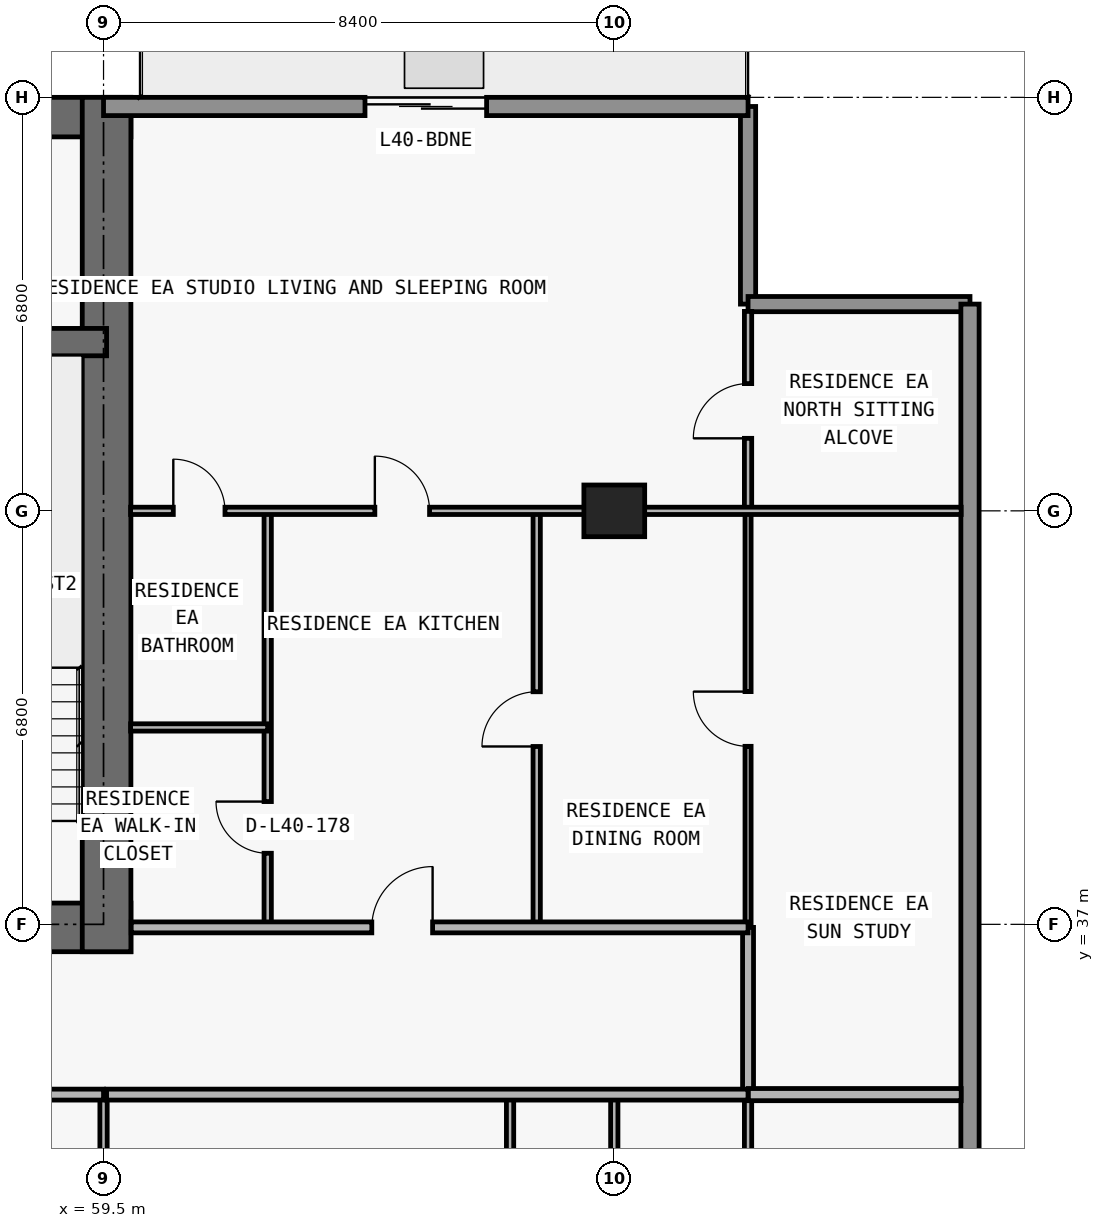
"""IFC4 building model, lengths in metres.
Left out: names, types, materials, properties, quantities, classifications, styles, units other than length and angle.
Written with IfcOpenShell. Run it as: python <this file> out.ifc"""

import sys

from ifc_helpers import new_model, si_unit, direction, frame, frame_2d, origin, origin_2d, place, context, subcontext, project, spatial, rectangle, extrude, element, fill, save


model = new_model("IFC4")
c1 = context("Model", 3, precision=1e-05, world=origin(), true_north=direction((0.0, 1.0)))
c2 = subcontext(c1, "Body", "Model", "MODEL_VIEW")
j1 = project(units=[si_unit("LENGTHUNIT", "METRE"), si_unit("PLANEANGLEUNIT", "RADIAN")], contexts=[c1])
p1 = place(None, origin())
s1 = spatial("IfcSite", under=j1, at=p1, CompositionType="ELEMENT")
p2 = place(p1, origin())
s2 = spatial("IfcBuilding", under=s1, at=p2, CompositionType="ELEMENT")
p3 = place(p2, frame((0.0, 0.0, 145.5)))
s3 = spatial("IfcBuildingStorey", under=s2, at=p3, CompositionType="ELEMENT", Elevation=145.5)
p4 = place(p3, frame((67.9, 43.8, 0.0), z_axis=(0.0, 0.0, 1.0), x_axis=(1.0, 0.0, 0.0)))
e1 = element("IfcColumn", 1, at=p4, inside=s3, PredefinedType="COLUMN", context=c2, shape_type="SweptSolid", body=[
    extrude(rectangle(XDim=1.0, YDim=0.85, at=origin_2d()), origin(), (0.0, 0.0, 1.0), 3.05),
])
p5 = place(p3, frame((17.85, 36.95, 0.0), z_axis=(0.0, 0.0, 1.0), x_axis=(1.0, 0.0, 0.0)))
e2 = element("IfcWall", 2, at=p5, inside=s3, PredefinedType="SHEAR", context=c2, shape_type="SweptSolid", body=[
    extrude(rectangle(XDim=42.1, YDim=0.8, at=frame_2d((21.05, 0.0))), origin(), (0.0, 0.0, 1.0), 3.05),
])
p6 = place(p5, frame((14.45, 0.0, 0.0)))
e3 = element("IfcOpeningElement", 3, at=p6, cuts=e2, PredefinedType="OPENING", context=c2, shape_type="SweptSolid", body=[
    extrude(rectangle(XDim=1.1, YDim=2.15, at=frame_2d((0.55, 1.075))), frame((0.0, 0.41, 0.0), z_axis=(0.0, -1.0, 0.0), x_axis=(1.0, 0.0, 0.0)), (0.0, 0.0, 1.0), 0.82),
])
p7 = place(p5, frame((6.3, 0.0, 0.0)))
e4 = element("IfcOpeningElement", 4, at=p7, cuts=e2, PredefinedType="OPENING", context=c2, shape_type="SweptSolid", body=[
    extrude(rectangle(XDim=1.05, YDim=2.15, at=frame_2d((0.525, 1.075))), frame((0.0, 0.41, 0.0), z_axis=(0.0, -1.0, 0.0), x_axis=(1.0, 0.0, 0.0)), (0.0, 0.0, 1.0), 0.82),
])
p8 = place(p5, frame((34.8, 0.0, 0.0)))
e5 = element("IfcOpeningElement", 5, at=p8, cuts=e2, PredefinedType="OPENING", context=c2, shape_type="SweptSolid", body=[
    extrude(rectangle(XDim=1.05, YDim=2.15, at=frame_2d((0.525, 1.075))), frame((0.0, 0.41, 0.0), z_axis=(0.0, -1.0, 0.0), x_axis=(1.0, 0.0, 0.0)), (0.0, 0.0, 1.0), 0.82),
])
p9 = place(p5, frame((10.913, 0.0, 0.0)))
e6 = element("IfcOpeningElement", 6, at=p9, cuts=e2, PredefinedType="OPENING", context=c2, shape_type="SweptSolid", body=[
    extrude(rectangle(XDim=1.05, YDim=2.15, at=frame_2d((0.525, 1.075))), frame((0.0, 0.41, 0.0), z_axis=(0.0, -1.0, 0.0), x_axis=(1.0, 0.0, 0.0)), (0.0, 0.0, 1.0), 0.82),
])
p10 = place(p5, frame((24.15, 0.0, 0.0)))
e7 = element("IfcOpeningElement", 7, at=p10, cuts=e2, PredefinedType="OPENING", context=c2, shape_type="SweptSolid", body=[
    extrude(rectangle(XDim=1.05, YDim=2.15, at=frame_2d((0.525, 1.075))), frame((0.0, 0.41, 0.0), z_axis=(0.0, -1.0, 0.0), x_axis=(1.0, 0.0, 0.0)), (0.0, 0.0, 1.0), 0.82),
])
p11 = place(p3, frame((17.85, 50.275, 0.0), z_axis=(0.0, 0.0, 1.0), x_axis=(1.0, 0.0, 0.0)))
e8 = element("IfcWall", 8, at=p11, inside=s3, PredefinedType="SHEAR", context=c2, shape_type="SweptSolid", body=[
    extrude(rectangle(XDim=42.1, YDim=0.65, at=frame_2d((21.05, 0.0))), origin(), (0.0, 0.0, 1.0), 3.05),
])
p12 = place(p3, frame((59.55, 36.55, 0.0), z_axis=(0.0, 0.0, 1.0), x_axis=(0.0, 1.0, 0.0)))
e9 = element("IfcWall", 9, at=p12, inside=s3, PredefinedType="SHEAR", context=c2, shape_type="SweptSolid", body=[
    extrude(rectangle(XDim=14.05, YDim=0.8, at=frame_2d((7.025, 0.0))), origin(), (0.0, 0.0, 1.0), 3.05),
])
p13 = place(p3, frame((18.25, 46.575, 0.0), z_axis=(0.0, 0.0, 1.0), x_axis=(1.0, 0.0, 0.0)))
e10 = element("IfcWall", 10, at=p13, inside=s3, PredefinedType="SHEAR", context=c2, shape_type="SweptSolid", body=[
    extrude(rectangle(XDim=41.3, YDim=0.45, at=frame_2d((20.65, 0.0))), origin(), (0.0, 0.0, 1.0), 3.05),
])
p14 = place(p13, frame((7.625, 0.0, 0.0)))
e11 = element("IfcOpeningElement", 11, at=p14, cuts=e10, PredefinedType="OPENING", context=c2, shape_type="SweptSolid", body=[
    extrude(rectangle(XDim=1.05, YDim=2.15, at=frame_2d((0.525, 1.075))), frame((0.0, 0.235, 0.0), z_axis=(0.0, -1.0, 0.0), x_axis=(1.0, 0.0, 0.0)), (0.0, 0.0, 1.0), 0.47),
])
p15 = place(p13, frame((32.675, 0.0, 0.0)))
e12 = element("IfcOpeningElement", 12, at=p15, cuts=e10, PredefinedType="OPENING", context=c2, shape_type="SweptSolid", body=[
    extrude(rectangle(XDim=1.05, YDim=2.15, at=frame_2d((0.525, 1.075))), frame((0.0, 0.235, 0.0), z_axis=(0.0, -1.0, 0.0), x_axis=(1.0, 0.0, 0.0)), (0.0, 0.0, 1.0), 0.47),
])
p16 = place(p3, frame((70.1, 50.45, 0.0), z_axis=(0.0, 0.0, 1.0), x_axis=(0.0, -1.0, 0.0)))
e13 = element("IfcWall", 13, at=p16, inside=s3, PredefinedType="ELEMENTEDWALL", context=c2, shape_type="SweptSolid", body=[
    extrude(rectangle(XDim=3.25, YDim=0.25, at=frame_2d((1.625, 0.0))), origin(), (0.0, 0.0, 1.0), 3.05),
])
p17 = place(p3, frame((70.1, 47.2, 0.0), z_axis=(0.0, 0.0, 1.0), x_axis=(1.0, 0.0, 0.0)))
e14 = element("IfcWall", 14, at=p17, inside=s3, PredefinedType="ELEMENTEDWALL", context=c2, shape_type="SweptSolid", body=[
    extrude(rectangle(XDim=3.65, YDim=0.25, at=frame_2d((1.825, 0.0))), origin(), (0.0, 0.0, 1.0), 3.05),
])
p18 = place(p3, frame((73.75, 47.2, 0.0), z_axis=(0.0, 0.0, 1.0), x_axis=(0.0, -1.0, 0.0)))
e15 = element("IfcWall", 15, at=p18, inside=s3, PredefinedType="STANDARD", context=c2, shape_type="SweptSolid", body=[
    extrude(rectangle(XDim=19.2, YDim=0.3, at=frame_2d((9.6, 0.0))), origin(), (0.0, 0.0, 1.0), 3.05),
])
p19 = place(p3, frame((59.5, 50.45, 0.0), z_axis=(0.0, 0.0, 1.0), x_axis=(1.0, 0.0, 0.0)))
e16 = element("IfcWall", 16, at=p19, inside=s3, PredefinedType="STANDARD", context=c2, shape_type="SweptSolid", body=[
    extrude(rectangle(XDim=10.6, YDim=0.3, at=frame_2d((5.3, 0.0))), origin(), (0.0, 0.0, 1.0), 3.05),
])
p20 = place(p19, frame((4.3, 0.0, 0.0)))
e17 = element("IfcOpeningElement", 17, at=p20, cuts=e16, PredefinedType="OPENING", context=c2, shape_type="SweptSolid", body=[
    extrude(rectangle(XDim=2.0, YDim=2.3, at=frame_2d((1.0, 1.15))), frame((0.0, 0.16, 0.0), z_axis=(0.0, -1.0, 0.0), x_axis=(1.0, 0.0, 0.0)), (0.0, 0.0, 1.0), 0.32),
])
p21 = place(p3, frame((59.5, 29.84, 0.0), z_axis=(0.0, 0.0, 1.0), x_axis=(0.0, 1.0, 0.0)))
e18 = element("IfcWall", 18, at=p21, inside=s3, PredefinedType="PARTITIONING", context=c2, shape_type="SweptSolid", body=[
    extrude(rectangle(XDim=4.36, YDim=0.12, at=frame_2d((2.18, 0.0))), origin(), (0.0, 0.0, 1.0), 2.174),
])
p22 = place(p3, frame((62.2, 36.95, 0.0), z_axis=(0.0, 0.0, 1.0), x_axis=(0.0, 1.0, 0.0)))
e19 = element("IfcWall", 19, at=p22, inside=s3, PredefinedType="PARTITIONING", context=c2, shape_type="SweptSolid", body=[
    extrude(rectangle(XDim=6.85, YDim=0.12, at=frame_2d((3.425, 0.0))), origin(), (0.0, 0.0, 1.0), 2.499),
])
p23 = place(p22, frame((1.219, 0.0, 0.0)))
e20 = element("IfcOpeningElement", 20, at=p23, cuts=e19, PredefinedType="OPENING", context=c2, shape_type="SweptSolid", body=[
    extrude(rectangle(XDim=0.85, YDim=2.1, at=frame_2d((0.425, 1.05))), frame((0.0, 0.07, 0.0), z_axis=(0.0, -1.0, 0.0), x_axis=(1.0, 0.0, 0.0)), (0.0, 0.0, 1.0), 0.14),
])
p24 = place(p3, frame((66.186, 29.84, 0.0), z_axis=(0.0, 0.0, 1.0), x_axis=(0.0, 1.0, 0.0)))
e21 = element("IfcWall", 21, at=p24, inside=s3, PredefinedType="PARTITIONING", context=c2, shape_type="SweptSolid", body=[
    extrude(rectangle(XDim=4.36, YDim=0.12, at=frame_2d((2.18, 0.0))), origin(), (0.0, 0.0, 1.0), 3.05),
])
p25 = place(p24, frame((1.755, 0.0, 0.0)))
e22 = element("IfcOpeningElement", 22, at=p25, cuts=e21, PredefinedType="OPENING", context=c2, shape_type="SweptSolid", body=[
    extrude(rectangle(XDim=0.85, YDim=2.1, at=frame_2d((0.425, 1.05))), frame((0.0, 0.07, 0.0), z_axis=(0.0, -1.0, 0.0), x_axis=(1.0, 0.0, 0.0)), (0.0, 0.0, 1.0), 0.14),
])
p26 = place(p3, frame((66.624, 36.95, 0.0), z_axis=(0.0, 0.0, 1.0), x_axis=(0.0, 1.0, 0.0)))
e23 = element("IfcWall", 23, at=p26, inside=s3, PredefinedType="PARTITIONING", context=c2, shape_type="SweptSolid", body=[
    extrude(rectangle(XDim=6.85, YDim=0.12, at=frame_2d((3.425, 0.0))), origin(), (0.0, 0.0, 1.0), 3.05),
])
p27 = place(p26, frame((2.975, 0.0, 0.0)))
e24 = element("IfcOpeningElement", 24, at=p27, cuts=e23, PredefinedType="OPENING", context=c2, shape_type="SweptSolid", body=[
    extrude(rectangle(XDim=0.9, YDim=2.15, at=frame_2d((0.45, 1.075))), frame((0.0, 0.07, 0.0), z_axis=(0.0, -1.0, 0.0), x_axis=(1.0, 0.0, 0.0)), (0.0, 0.0, 1.0), 0.14),
])
p28 = place(p3, frame((67.9, 29.84, 0.0), z_axis=(0.0, 0.0, 1.0), x_axis=(0.0, 1.0, 0.0)))
e25 = element("IfcWall", 25, at=p28, inside=s3, PredefinedType="PARTITIONING", context=c2, shape_type="SweptSolid", body=[
    extrude(rectangle(XDim=4.36, YDim=0.12, at=frame_2d((2.18, 0.0))), origin(), (0.0, 0.0, 1.0), 2.174),
])
p29 = place(p3, frame((70.1, 29.84, 0.0), z_axis=(0.0, 0.0, 1.0), x_axis=(0.0, 1.0, 0.0)))
e26 = element("IfcWall", 26, at=p29, inside=s3, PredefinedType="PARTITIONING", context=c2, shape_type="SweptSolid", body=[
    extrude(rectangle(XDim=4.36, YDim=0.12, at=frame_2d((2.18, 0.0))), origin(), (0.0, 0.0, 1.0), 3.05),
])
p30 = place(p3, frame((70.1, 34.205, 0.0), z_axis=(0.0, 0.0, 1.0), x_axis=(0.0, 1.0, 0.0)))
e27 = element("IfcWall", 27, at=p30, inside=s3, PredefinedType="PARTITIONING", context=c2, shape_type="SweptSolid", body=[
    extrude(rectangle(XDim=2.745, YDim=0.18, at=frame_2d((1.373, 0.0))), origin(), (0.0, 0.0, 1.0), 3.05),
])
p31 = place(p3, frame((70.1, 36.955, 0.0), z_axis=(0.0, 0.0, 1.0), x_axis=(0.0, 1.0, 0.0)))
e28 = element("IfcWall", 28, at=p31, inside=s3, PredefinedType="MOVABLE", context=c2, shape_type="SweptSolid", body=[
    extrude(rectangle(XDim=6.845, YDim=0.1, at=frame_2d((3.422, 0.0))), origin(), (0.0, 0.0, 1.0), 3.05),
])
p32 = place(p31, frame((2.972, 0.0, 0.0)))
e29 = element("IfcOpeningElement", 29, at=p32, cuts=e28, PredefinedType="OPENING", context=c2, shape_type="SweptSolid", body=[
    extrude(rectangle(XDim=0.9, YDim=2.15, at=frame_2d((0.45, 1.075))), frame((0.0, 0.06, 0.0), z_axis=(0.0, -1.0, 0.0), x_axis=(1.0, 0.0, 0.0)), (0.0, 0.0, 1.0), 0.12),
])
p33 = place(p3, frame((70.1, 43.805, 0.0), z_axis=(0.0, 0.0, 1.0), x_axis=(0.0, 1.0, 0.0)))
e30 = element("IfcWall", 30, at=p33, inside=s3, PredefinedType="PARTITIONING", context=c2, shape_type="SweptSolid", body=[
    extrude(rectangle(XDim=3.275, YDim=0.12, at=frame_2d((1.638, 0.0))), origin(), (0.0, 0.0, 1.0), 3.05),
])
p34 = place(p33, frame((1.188, 0.0, 0.0)))
e31 = element("IfcOpeningElement", 31, at=p34, cuts=e30, PredefinedType="OPENING", context=c2, shape_type="SweptSolid", body=[
    extrude(rectangle(XDim=0.9, YDim=2.15, at=frame_2d((0.45, 1.075))), frame((0.0, 0.07, 0.0), z_axis=(0.0, -1.0, 0.0), x_axis=(1.0, 0.0, 0.0)), (0.0, 0.0, 1.0), 0.14),
])
p35 = place(p3, frame((26.7, 34.2, 0.0), z_axis=(0.0, 0.0, 1.0), x_axis=(1.0, 0.0, 0.0)))
e32 = element("IfcWall", 32, at=p35, inside=s3, PredefinedType="PARTITIONING", context=c2, shape_type="SweptSolid", body=[
    extrude(rectangle(XDim=32.8, YDim=0.18, at=frame_2d((16.4, 0.0))), origin(), (0.0, 0.0, 1.0), 3.05),
])
p36 = place(p35, frame((2.519, 0.0, 0.0)))
e33 = element("IfcOpeningElement", 33, at=p36, cuts=e32, PredefinedType="OPENING", context=c2, shape_type="SweptSolid", body=[
    extrude(rectangle(XDim=1.0, YDim=2.2, at=frame_2d((0.5, 1.1))), frame((0.0, 0.1, 0.0), z_axis=(0.0, -1.0, 0.0), x_axis=(1.0, 0.0, 0.0)), (0.0, 0.0, 1.0), 0.2),
])
p37 = place(p35, frame((10.792, 0.0, 0.0)))
e34 = element("IfcOpeningElement", 34, at=p37, cuts=e32, PredefinedType="OPENING", context=c2, shape_type="SweptSolid", body=[
    extrude(rectangle(XDim=1.0, YDim=2.2, at=frame_2d((0.5, 1.1))), frame((0.0, 0.1, 0.0), z_axis=(0.0, -1.0, 0.0), x_axis=(1.0, 0.0, 0.0)), (0.0, 0.0, 1.0), 0.2),
])
p38 = place(p35, frame((27.146, 0.0, 0.0)))
e35 = element("IfcOpeningElement", 35, at=p38, cuts=e32, PredefinedType="OPENING", context=c2, shape_type="SweptSolid", body=[
    extrude(rectangle(XDim=1.0, YDim=2.2, at=frame_2d((0.5, 1.1))), frame((0.0, 0.1, 0.0), z_axis=(0.0, -1.0, 0.0), x_axis=(1.0, 0.0, 0.0)), (0.0, 0.0, 1.0), 0.2),
])
p39 = place(p3, frame((59.55, 34.2, 0.0), z_axis=(0.0, 0.0, 1.0), x_axis=(1.0, 0.0, 0.0)))
e36 = element("IfcWall", 36, at=p39, inside=s3, PredefinedType="PARTITIONING", context=c2, shape_type="SweptSolid", body=[
    extrude(rectangle(XDim=10.55, YDim=0.18, at=frame_2d((5.275, 0.0))), origin(), (0.0, 0.0, 1.0), 3.05),
])
p40 = place(p3, frame((70.105, 34.2, 0.0), z_axis=(0.0, 0.0, 1.0), x_axis=(1.0, 0.0, 0.0)))
e37 = element("IfcWall", 37, at=p40, inside=s3, PredefinedType="PARTITIONING", context=c2, shape_type="SweptSolid", body=[
    extrude(rectangle(XDim=3.5, YDim=0.2, at=frame_2d((1.75, 0.0))), origin(), (0.0, 0.0, 1.0), 3.05),
])
p41 = place(p3, frame((59.955, 36.95, 0.0), z_axis=(0.0, 0.0, 1.0), x_axis=(1.0, 0.0, 0.0)))
e38 = element("IfcWall", 38, at=p41, inside=s3, PredefinedType="PARTITIONING", context=c2, shape_type="SweptSolid", body=[
    extrude(rectangle(XDim=10.145, YDim=0.18, at=frame_2d((5.073, 0.0))), origin(), (0.0, 0.0, 1.0), 3.05),
])
p42 = place(p41, frame((3.957, 0.0, 0.0)))
e39 = element("IfcOpeningElement", 39, at=p42, cuts=e38, PredefinedType="OPENING", context=c2, shape_type="SweptSolid", body=[
    extrude(rectangle(XDim=1.0, YDim=2.2, at=frame_2d((0.5, 1.1))), frame((0.0, 0.1, 0.0), z_axis=(0.0, -1.0, 0.0), x_axis=(1.0, 0.0, 0.0)), (0.0, 0.0, 1.0), 0.2),
])
p43 = place(p3, frame((59.945, 40.238, 0.0), z_axis=(0.0, 0.0, 1.0), x_axis=(1.0, 0.0, 0.0)))
e40 = element("IfcWall", 40, at=p43, inside=s3, PredefinedType="PARTITIONING", context=c2, shape_type="SweptSolid", body=[
    extrude(rectangle(XDim=2.255, YDim=0.12, at=frame_2d((1.127, 0.0))), origin(), (0.0, 0.0, 1.0), 3.05),
])
p44 = place(p3, frame((59.945, 43.8, 0.0), z_axis=(0.0, 0.0, 1.0), x_axis=(1.0, 0.0, 0.0)))
e41 = element("IfcWall", 41, at=p44, inside=s3, PredefinedType="PARTITIONING", context=c2, shape_type="SweptSolid", body=[
    extrude(rectangle(XDim=13.66, YDim=0.12, at=frame_2d((6.83, 0.0))), origin(), (0.0, 0.0, 1.0), 2.339),
])
p45 = place(p44, frame((4.017, 0.0, 0.0)))
e42 = element("IfcOpeningElement", 42, at=p45, cuts=e41, PredefinedType="OPENING", context=c2, shape_type="SweptSolid", body=[
    extrude(rectangle(XDim=0.9, YDim=2.15, at=frame_2d((0.45, 1.075))), frame((0.0, 0.07, 0.0), z_axis=(0.0, -1.0, 0.0), x_axis=(1.0, 0.0, 0.0)), (0.0, 0.0, 1.0), 0.14),
])
p46 = place(p44, frame((0.702, 0.0, 0.0)))
e43 = element("IfcOpeningElement", 43, at=p46, cuts=e41, PredefinedType="OPENING", context=c2, shape_type="SweptSolid", body=[
    extrude(rectangle(XDim=0.85, YDim=2.1, at=frame_2d((0.425, 1.05))), frame((0.0, 0.07, 0.0), z_axis=(0.0, -1.0, 0.0), x_axis=(1.0, 0.0, 0.0)), (0.0, 0.0, 1.0), 0.14),
])
p47 = place(p20, origin())
e44 = element("IfcDoor", 44, at=p47, inside=s3, OperationType="DOUBLE_DOOR_SLIDING", PredefinedType="DOOR", context=c2, shape_type="SweptSolid", body=[
    extrude(rectangle(XDim=2.0, YDim=2.3, at=frame_2d((1.0, 1.15))), frame((0.0, 0.025, 0.0), z_axis=(0.0, -1.0, 0.0), x_axis=(1.0, 0.0, 0.0)), (0.0, 0.0, 1.0), 0.05),
])
fill(e17, e44)
p48 = place(p27, origin())
e45 = element("IfcDoor", 45, at=p48, inside=s3, OperationType="SINGLE_SWING_LEFT", PredefinedType="DOOR", context=c2, shape_type="SweptSolid", body=[
    extrude(rectangle(XDim=0.9, YDim=2.15, at=frame_2d((0.45, 1.075))), frame((0.0, 0.025, 0.0), z_axis=(0.0, -1.0, 0.0), x_axis=(1.0, 0.0, 0.0)), (0.0, 0.0, 1.0), 0.05),
])
fill(e24, e45)
p49 = place(p42, origin())
e46 = element("IfcDoor", 46, at=p49, inside=s3, OperationType="SINGLE_SWING_RIGHT", PredefinedType="DOOR", context=c2, shape_type="SweptSolid", body=[
    extrude(rectangle(XDim=1.0, YDim=2.2, at=frame_2d((0.5, 1.1))), frame((0.0, 0.025, 0.0), z_axis=(0.0, -1.0, 0.0), x_axis=(1.0, 0.0, 0.0)), (0.0, 0.0, 1.0), 0.05),
])
fill(e39, e46)
p50 = place(p45, origin())
e47 = element("IfcDoor", 47, at=p50, inside=s3, OperationType="SINGLE_SWING_LEFT", PredefinedType="DOOR", context=c2, shape_type="SweptSolid", body=[
    extrude(rectangle(XDim=0.9, YDim=2.15, at=frame_2d((0.45, 1.075))), frame((0.0, 0.025, 0.0), z_axis=(0.0, -1.0, 0.0), x_axis=(1.0, 0.0, 0.0)), (0.0, 0.0, 1.0), 0.05),
])
fill(e42, e47)
p51 = place(p23, origin())
e48 = element("IfcDoor", 48, at=p51, inside=s3, OperationType="SINGLE_SWING_RIGHT", PredefinedType="DOOR", context=c2, shape_type="SweptSolid", body=[
    extrude(rectangle(XDim=0.85, YDim=2.1, at=frame_2d((0.425, 1.05))), frame((0.0, 0.025, 0.0), z_axis=(0.0, -1.0, 0.0), x_axis=(1.0, 0.0, 0.0)), (0.0, 0.0, 1.0), 0.05),
])
fill(e20, e48)
p52 = place(p46, origin())
e49 = element("IfcDoor", 49, at=p52, inside=s3, OperationType="SINGLE_SWING_LEFT", PredefinedType="DOOR", context=c2, shape_type="SweptSolid", body=[
    extrude(rectangle(XDim=0.85, YDim=2.1, at=frame_2d((0.425, 1.05))), frame((0.0, 0.025, 0.0), z_axis=(0.0, -1.0, 0.0), x_axis=(1.0, 0.0, 0.0)), (0.0, 0.0, 1.0), 0.05),
])
fill(e43, e49)
p53 = place(p32, origin())
e50 = element("IfcDoor", 50, at=p53, inside=s3, OperationType="SINGLE_SWING_RIGHT", PredefinedType="DOOR", context=c2, shape_type="SweptSolid", body=[
    extrude(rectangle(XDim=0.9, YDim=2.15, at=frame_2d((0.45, 1.075))), frame((0.0, 0.025, 0.0), z_axis=(0.0, -1.0, 0.0), x_axis=(1.0, 0.0, 0.0)), (0.0, 0.0, 1.0), 0.05),
])
fill(e29, e50)
p54 = place(p34, origin())
e51 = element("IfcDoor", 51, at=p54, inside=s3, OperationType="SINGLE_SWING_LEFT", PredefinedType="DOOR", context=c2, shape_type="SweptSolid", body=[
    extrude(rectangle(XDim=0.9, YDim=2.15, at=frame_2d((0.45, 1.075))), frame((0.0, 0.025, 0.0), z_axis=(0.0, -1.0, 0.0), x_axis=(1.0, 0.0, 0.0)), (0.0, 0.0, 1.0), 0.05),
])
fill(e31, e51)
save(model, sys.argv[1])
